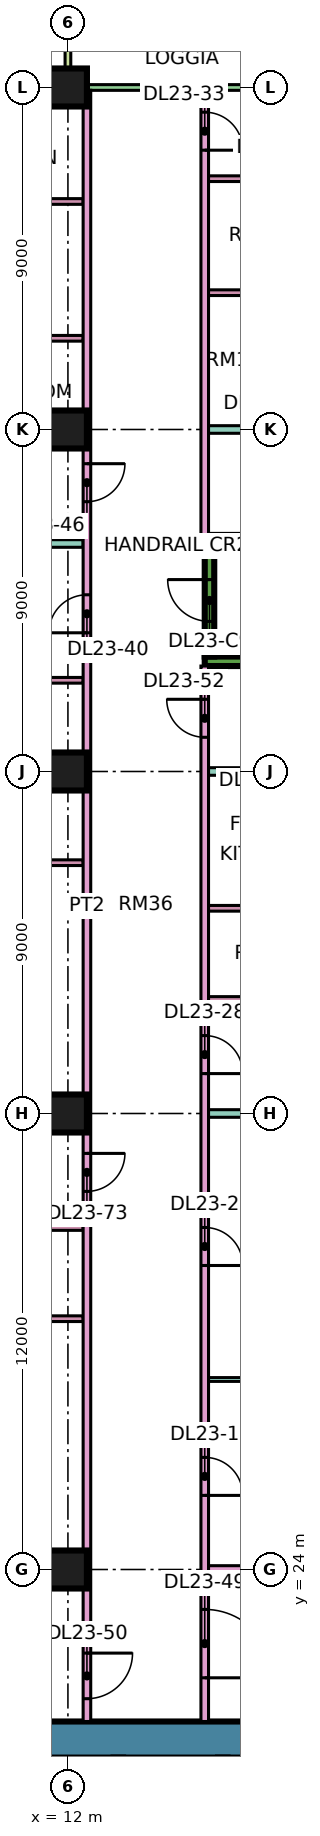
"""IFC4 building model, lengths in metres.
Left out: names, types, materials, properties, quantities, classifications, styles, units other than length and angle.
Written with IfcOpenShell. Run it as: python <this file> out.ifc"""

import sys

from ifc_helpers import new_model, si_unit, direction, frame, frame_2d, origin, origin_2d, place, context, subcontext, project, spatial, rectangle, extrude, element, fill, save


model = new_model("IFC4")
c1 = context("Model", 3, precision=1e-05, world=origin(), true_north=direction((0.0, 1.0)))
c2 = subcontext(c1, "Body", "Model", "MODEL_VIEW")
j1 = project(units=[si_unit("LENGTHUNIT", "METRE"), si_unit("PLANEANGLEUNIT", "RADIAN")], contexts=[c1])
p1 = place(None, origin())
s1 = spatial("IfcSite", under=j1, at=p1, CompositionType="ELEMENT")
p2 = place(p1, origin())
s2 = spatial("IfcBuilding", under=s1, at=p2, CompositionType="ELEMENT")
p3 = place(p2, frame((0.0, 0.0, 103.15)))
s3 = spatial("IfcBuildingStorey", under=s2, at=p3, CompositionType="ELEMENT", Elevation=103.15)
for number, where, z_axis, x_axis in (
    (1, (12.0, 24.0, 0.0), (0.0, 0.0, 1.0), (1.0, 0.0, 0.0)),
    (2, (12.0, 36.0, 0.0), (0.0, 0.0, 1.0), (1.0, 0.0, 0.0)),
    (3, (12.0, 45.0, 0.0), (0.0, 0.0, 1.0), (1.0, 0.0, 0.0)),
    (4, (12.0, 54.0, 0.0), (0.0, 0.0, 1.0), (1.0, 0.0, 0.0)),
    (5, (12.0, 63.0, 0.0), (0.0, 0.0, 1.0), (1.0, 0.0, 0.0)),
):
    element("IfcColumn", number, at=place(p3, frame(where, z_axis=z_axis, x_axis=x_axis)), inside=s3, PredefinedType="COLUMN", context=c2, shape_type="SweptSolid", body=[
        extrude(rectangle(XDim=1.0, YDim=1.0, at=origin_2d()), origin(), (0.0, 0.0, 1.0), 3.75),
    ])
p4 = place(p3, frame((9.0, 19.525, 0.0), z_axis=(0.0, 0.0, 1.0), x_axis=(1.0, 0.0, 0.0)))
e6 = element("IfcWall", 6, at=p4, inside=s3, PredefinedType="SHEAR", context=c2, shape_type="SweptSolid", body=[
    extrude(rectangle(XDim=25.0, YDim=0.95, at=frame_2d((12.5, 0.0))), origin(), (0.0, 0.0, 1.0), 3.75),
])
p5 = place(p4, frame((19.1, 0.0, 0.0)))
e7 = element("IfcOpeningElement", 7, at=p5, cuts=e6, PredefinedType="OPENING", context=c2, shape_type="SweptSolid", body=[
    extrude(rectangle(XDim=1.8, YDim=2.4, at=frame_2d((0.9, 1.2))), frame((0.0, 0.485, 0.0), z_axis=(0.0, -1.0, 0.0), x_axis=(1.0, 0.0, 0.0)), (0.0, 0.0, 1.0), 0.97),
])
for number, where, z_axis, x_axis in (
    (8, (15.6, 47.9, 0.0), (0.0, 0.0, 1.0), (1.0, 0.0, 0.0)),
    (9, (15.6, 51.1, 0.0), (0.0, 0.0, 1.0), (1.0, 0.0, 0.0)),
):
    element("IfcWall", number, at=place(p3, frame(where, z_axis=z_axis, x_axis=x_axis)), inside=s3, PredefinedType="SHEAR", context=c2, shape_type="SweptSolid", body=[
        extrude(rectangle(XDim=7.0, YDim=0.25, at=frame_2d((3.5, 0.0))), origin(), (0.0, 0.0, 1.0), 3.75),
    ])
p6 = place(p3, frame((15.725, 48.025, 0.0), z_axis=(0.0, 0.0, 1.0), x_axis=(0.0, 1.0, 0.0)))
e10 = element("IfcWall", 10, at=p6, inside=s3, PredefinedType="SHEAR", context=c2, shape_type="SweptSolid", body=[
    extrude(rectangle(XDim=2.95, YDim=0.25, at=frame_2d((1.475, 0.0))), origin(), (0.0, 0.0, 1.0), 3.75),
])
p7 = place(p6, frame((0.925, 0.0, 0.0)))
e11 = element("IfcOpeningElement", 11, at=p7, cuts=e10, PredefinedType="OPENING", context=c2, shape_type="SweptSolid", body=[
    extrude(rectangle(XDim=1.1, YDim=2.2, at=frame_2d((0.55, 1.1))), frame((0.0, 0.135, 0.0), z_axis=(0.0, -1.0, 0.0), x_axis=(1.0, 0.0, 0.0)), (0.0, 0.0, 1.0), 0.27),
])
p8 = place(p3, frame((22.425, 63.0, 0.0), z_axis=(0.0, 0.0, 1.0), x_axis=(-1.0, 0.0, 0.0)))
e12 = element("IfcWall", 12, at=p8, inside=s3, PredefinedType="SOLIDWALL", context=c2, shape_type="SweptSolid", body=[
    extrude(rectangle(XDim=10.35, YDim=0.15, at=frame_2d((5.175, 0.0))), origin(), (0.0, 0.0, 1.0), 3.35),
])
p9 = place(p8, frame((0.562, 0.0, 0.45)))
e13 = element("IfcOpeningElement", 13, at=p9, cuts=e12, PredefinedType="OPENING", context=c2, shape_type="SweptSolid", body=[
    extrude(rectangle(XDim=1.8, YDim=2.4, at=frame_2d((0.9, 1.2))), frame((0.0, 0.085, 0.0), z_axis=(0.0, -1.0, 0.0), x_axis=(1.0, 0.0, 0.0)), (0.0, 0.0, 1.0), 0.17),
])
p10 = place(p8, frame((3.975, 0.0, 0.0)))
e14 = element("IfcOpeningElement", 14, at=p10, cuts=e12, PredefinedType="OPENING", context=c2, shape_type="SweptSolid", body=[
    extrude(rectangle(XDim=1.8, YDim=2.4, at=frame_2d((0.9, 1.2))), frame((0.0, 0.085, 0.0), z_axis=(0.0, -1.0, 0.0), x_axis=(1.0, 0.0, 0.0)), (0.0, 0.0, 1.0), 0.17),
])
p11 = place(p3, frame((12.0, 64.5, 0.0), z_axis=(0.0, 0.0, 1.0), x_axis=(0.0, -1.0, 0.0)))
e15 = element("IfcWall", 15, at=p11, inside=s3, PredefinedType="SOLIDWALL", context=c2, shape_type="SweptSolid", body=[
    extrude(rectangle(XDim=1.5, YDim=0.15, at=frame_2d((0.75, 0.0))), origin(), (0.0, 0.0, 1.0), 3.35),
])
p12 = place(p3, frame((0.0, 36.0, 0.0), z_axis=(0.0, 0.0, 1.0), x_axis=(1.0, 0.0, 0.0)))
e16 = element("IfcWall", 16, at=p12, inside=s3, PredefinedType="PARTITIONING", context=c2, shape_type="SweptSolid", body=[
    extrude(rectangle(XDim=12.4, YDim=0.2, at=frame_2d((6.2, 0.0))), origin(), (0.0, 0.0, 1.0), 3.35),
])
p13 = place(p3, frame((-1.35, 51.0, 0.0), z_axis=(0.0, 0.0, 1.0), x_axis=(1.0, 0.0, 0.0)))
e17 = element("IfcWall", 17, at=p13, inside=s3, PredefinedType="PARTITIONING", context=c2, shape_type="SweptSolid", body=[
    extrude(rectangle(XDim=13.75, YDim=0.2, at=frame_2d((6.875, 0.0))), origin(), (0.0, 0.0, 1.0), 3.35),
])
p14 = place(p3, frame((0.074, 22.4, 0.0), z_axis=(0.0, 0.0, 1.0), x_axis=(1.0, 0.0, 0.0)))
e18 = element("IfcWall", 18, at=p14, inside=s3, PredefinedType="PARTITIONING", context=c2, shape_type="SweptSolid", body=[
    extrude(rectangle(XDim=12.326, YDim=0.2, at=frame_2d((6.163, 0.0))), origin(), (0.0, 0.0, 1.0), 3.35),
])
for number, where, z_axis, x_axis in (
    (19, (7.175, 30.6, 0.0), (0.0, 0.0, 1.0), (1.0, 0.0, 0.0)),
    (20, (7.175, 33.0, 0.0), (0.0, 0.0, 1.0), (1.0, 0.0, 0.0)),
    (21, (7.175, 42.6, 0.0), (0.0, 0.0, 1.0), (1.0, 0.0, 0.0)),
    (22, (7.175, 45.3, 0.0), (0.0, 0.0, 1.0), (1.0, 0.0, 0.0)),
    (23, (7.175, 47.4, 0.0), (0.0, 0.0, 1.0), (1.0, 0.0, 0.0)),
):
    element("IfcWall", number, at=place(p3, frame(where, z_axis=z_axis, x_axis=x_axis)), inside=s3, PredefinedType="PARTITIONING", context=c2, shape_type="SweptSolid", body=[
        extrude(rectangle(XDim=5.225, YDim=0.15, at=frame_2d((2.612, 0.0))), origin(), (0.0, 0.0, 1.0), 3.35),
    ])
p15 = place(p3, frame((8.375, 54.3, 0.0), z_axis=(0.0, 0.0, 1.0), x_axis=(1.0, 0.0, 0.0)))
e24 = element("IfcWall", 24, at=p15, inside=s3, PredefinedType="PARTITIONING", context=c2, shape_type="SweptSolid", body=[
    extrude(rectangle(XDim=4.025, YDim=0.15, at=frame_2d((2.012, 0.0))), origin(), (0.0, 0.0, 1.0), 3.35),
])
p16 = place(p15, frame((1.675, 0.0, 0.0)))
e25 = element("IfcOpeningElement", 25, at=p16, cuts=e24, PredefinedType="OPENING", context=c2, shape_type="SweptSolid", body=[
    extrude(rectangle(XDim=0.8, YDim=2.1, at=frame_2d((0.4, 1.05))), frame((0.0, 0.085, 0.0), z_axis=(0.0, -1.0, 0.0), x_axis=(1.0, 0.0, 0.0)), (0.0, 0.0, 1.0), 0.17),
])
for number, where, z_axis, x_axis in (
    (26, (8.375, 56.4, 0.0), (0.0, 0.0, 1.0), (1.0, 0.0, 0.0)),
    (27, (8.375, 60.0, 0.0), (0.0, 0.0, 1.0), (1.0, 0.0, 0.0)),
):
    element("IfcWall", number, at=place(p3, frame(where, z_axis=z_axis, x_axis=x_axis)), inside=s3, PredefinedType="PARTITIONING", context=c2, shape_type="SweptSolid", body=[
        extrude(rectangle(XDim=4.025, YDim=0.15, at=frame_2d((2.012, 0.0))), origin(), (0.0, 0.0, 1.0), 3.35),
    ])
p17 = place(p3, frame((12.5, 20.0, 0.0), z_axis=(0.0, 0.0, 1.0), x_axis=(0.0, 1.0, 0.0)))
e28 = element("IfcWall", 28, at=p17, inside=s3, PredefinedType="PARTITIONING", context=c2, shape_type="SweptSolid", body=[
    extrude(rectangle(XDim=42.926, YDim=0.2, at=frame_2d((21.463, 0.0))), origin(), (0.0, 0.0, 1.0), 3.35),
])
p18 = place(p17, frame((28.65, 0.0, 0.0)))
e29 = element("IfcOpeningElement", 29, at=p18, cuts=e28, PredefinedType="OPENING", context=c2, shape_type="SweptSolid", body=[
    extrude(rectangle(XDim=1.0, YDim=2.1, at=frame_2d((0.5, 1.05))), frame((0.0, 0.11, 0.0), z_axis=(0.0, -1.0, 0.0), x_axis=(1.0, 0.0, 0.0)), (0.0, 0.0, 1.0), 0.22),
])
p19 = place(p17, frame((32.1, 0.0, 0.0)))
e30 = element("IfcOpeningElement", 30, at=p19, cuts=e28, PredefinedType="OPENING", context=c2, shape_type="SweptSolid", body=[
    extrude(rectangle(XDim=1.0, YDim=2.1, at=frame_2d((0.5, 1.05))), frame((0.0, 0.11, 0.0), z_axis=(0.0, -1.0, 0.0), x_axis=(1.0, 0.0, 0.0)), (0.0, 0.0, 1.0), 0.22),
])
p20 = place(p17, frame((0.6, 0.0, 0.0)))
e31 = element("IfcOpeningElement", 31, at=p20, cuts=e28, PredefinedType="OPENING", context=c2, shape_type="SweptSolid", body=[
    extrude(rectangle(XDim=1.2, YDim=2.1, at=frame_2d((0.6, 1.05))), frame((0.0, 0.11, 0.0), z_axis=(0.0, -1.0, 0.0), x_axis=(1.0, 0.0, 0.0)), (0.0, 0.0, 1.0), 0.22),
])
p21 = place(p17, frame((13.95, 0.0, 0.0)))
e32 = element("IfcOpeningElement", 32, at=p21, cuts=e28, PredefinedType="OPENING", context=c2, shape_type="SweptSolid", body=[
    extrude(rectangle(XDim=1.0, YDim=2.1, at=frame_2d((0.5, 1.05))), frame((0.0, 0.11, 0.0), z_axis=(0.0, -1.0, 0.0), x_axis=(1.0, 0.0, 0.0)), (0.0, 0.0, 1.0), 0.22),
])
p22 = place(p3, frame((15.6, 20.0, 0.0), z_axis=(0.0, 0.0, 1.0), x_axis=(0.0, 1.0, 0.0)))
e33 = element("IfcWall", 33, at=p22, inside=s3, PredefinedType="PARTITIONING", context=c2, shape_type="SweptSolid", body=[
    extrude(rectangle(XDim=27.775, YDim=0.2, at=frame_2d((13.887, 0.0))), origin(), (0.0, 0.0, 1.0), 3.35),
])
p23 = place(p22, frame((5.95, 0.0, 0.0)))
e34 = element("IfcOpeningElement", 34, at=p23, cuts=e33, PredefinedType="OPENING", context=c2, shape_type="SweptSolid", body=[
    extrude(rectangle(XDim=1.0, YDim=2.1, at=frame_2d((0.5, 1.05))), frame((0.0, 0.11, 0.0), z_axis=(0.0, -1.0, 0.0), x_axis=(1.0, 0.0, 0.0)), (0.0, 0.0, 1.0), 0.22),
])
p24 = place(p22, frame((12.0, 0.0, 0.0)))
e35 = element("IfcOpeningElement", 35, at=p24, cuts=e33, PredefinedType="OPENING", context=c2, shape_type="SweptSolid", body=[
    extrude(rectangle(XDim=1.0, YDim=2.1, at=frame_2d((0.5, 1.05))), frame((0.0, 0.11, 0.0), z_axis=(0.0, -1.0, 0.0), x_axis=(1.0, 0.0, 0.0)), (0.0, 0.0, 1.0), 0.22),
])
p25 = place(p22, frame((17.05, 0.0, 0.0)))
e36 = element("IfcOpeningElement", 36, at=p25, cuts=e33, PredefinedType="OPENING", context=c2, shape_type="SweptSolid", body=[
    extrude(rectangle(XDim=1.0, YDim=2.1, at=frame_2d((0.5, 1.05))), frame((0.0, 0.11, 0.0), z_axis=(0.0, -1.0, 0.0), x_axis=(1.0, 0.0, 0.0)), (0.0, 0.0, 1.0), 0.22),
])
p26 = place(p22, frame((1.15, 0.0, 0.0)))
e37 = element("IfcOpeningElement", 37, at=p26, cuts=e33, PredefinedType="OPENING", context=c2, shape_type="SweptSolid", body=[
    extrude(rectangle(XDim=1.8, YDim=2.1, at=frame_2d((0.9, 1.05))), frame((0.0, 0.11, 0.0), z_axis=(0.0, -1.0, 0.0), x_axis=(1.0, 0.0, 0.0)), (0.0, 0.0, 1.0), 0.22),
])
p27 = place(p22, frame((25.9, 0.0, 0.0)))
e38 = element("IfcOpeningElement", 38, at=p27, cuts=e33, PredefinedType="OPENING", context=c2, shape_type="SweptSolid", body=[
    extrude(rectangle(XDim=1.0, YDim=2.1, at=frame_2d((0.5, 1.05))), frame((0.0, 0.11, 0.0), z_axis=(0.0, -1.0, 0.0), x_axis=(1.0, 0.0, 0.0)), (0.0, 0.0, 1.0), 0.22),
])
p28 = place(p3, frame((15.6, 51.225, 0.0), z_axis=(0.0, 0.0, 1.0), x_axis=(0.0, 1.0, 0.0)))
e39 = element("IfcWall", 39, at=p28, inside=s3, PredefinedType="PARTITIONING", context=c2, shape_type="SweptSolid", body=[
    extrude(rectangle(XDim=11.701, YDim=0.2, at=frame_2d((5.851, 0.0))), origin(), (0.0, 0.0, 1.0), 3.35),
])
p29 = place(p28, frame((10.125, 0.0, 0.0)))
e40 = element("IfcOpeningElement", 40, at=p29, cuts=e39, PredefinedType="OPENING", context=c2, shape_type="SweptSolid", body=[
    extrude(rectangle(XDim=1.0, YDim=2.1, at=frame_2d((0.5, 1.05))), frame((0.0, 0.11, 0.0), z_axis=(0.0, -1.0, 0.0), x_axis=(1.0, 0.0, 0.0)), (0.0, 0.0, 1.0), 0.22),
])
p30 = place(p3, frame((15.7, 24.0, 0.0), z_axis=(0.0, 0.0, 1.0), x_axis=(1.0, 0.0, 0.0)))
e41 = element("IfcWall", 41, at=p30, inside=s3, PredefinedType="PARTITIONING", context=c2, shape_type="SweptSolid", body=[
    extrude(rectangle(XDim=5.8, YDim=0.2, at=frame_2d((2.9, 0.0))), origin(), (0.0, 0.0, 1.0), 3.35),
])
p31 = place(p3, frame((15.7, 29.0, 0.0), z_axis=(0.0, 0.0, 1.0), x_axis=(1.0, 0.0, 0.0)))
e42 = element("IfcWall", 42, at=p31, inside=s3, PredefinedType="PARTITIONING", context=c2, shape_type="SweptSolid", body=[
    extrude(rectangle(XDim=5.8, YDim=0.1, at=frame_2d((2.9, 0.0))), origin(), (0.0, 0.0, 1.0), 3.35),
])
p32 = place(p3, frame((15.7, 36.0, 0.0), z_axis=(0.0, 0.0, 1.0), x_axis=(1.0, 0.0, 0.0)))
e43 = element("IfcWall", 43, at=p32, inside=s3, PredefinedType="PARTITIONING", context=c2, shape_type="SweptSolid", body=[
    extrude(rectangle(XDim=8.3, YDim=0.2, at=frame_2d((4.15, 0.0))), origin(), (0.0, 0.0, 1.0), 3.35),
])
for number, where, z_axis, x_axis in (
    (44, (15.7, 39.0, 0.0), (0.0, 0.0, 1.0), (1.0, 0.0, 0.0)),
    (45, (15.7, 41.4, 0.0), (0.0, 0.0, 1.0), (1.0, 0.0, 0.0)),
):
    element("IfcWall", number, at=place(p3, frame(where, z_axis=z_axis, x_axis=x_axis)), inside=s3, PredefinedType="PARTITIONING", context=c2, shape_type="SweptSolid", body=[
        extrude(rectangle(XDim=2.825, YDim=0.15, at=frame_2d((1.413, 0.0))), origin(), (0.0, 0.0, 1.0), 3.35),
    ])
p33 = place(p3, frame((15.7, 45.0, 0.0), z_axis=(0.0, 0.0, 1.0), x_axis=(1.0, 0.0, 0.0)))
e46 = element("IfcWall", 46, at=p33, inside=s3, PredefinedType="PARTITIONING", context=c2, shape_type="SweptSolid", body=[
    extrude(rectangle(XDim=8.226, YDim=0.2, at=frame_2d((4.113, 0.0))), origin(), (0.0, 0.0, 1.0), 3.35),
])
p34 = place(p3, frame((15.7, 54.0, 0.0), z_axis=(0.0, 0.0, 1.0), x_axis=(1.0, 0.0, 0.0)))
e47 = element("IfcWall", 47, at=p34, inside=s3, PredefinedType="PARTITIONING", context=c2, shape_type="SweptSolid", body=[
    extrude(rectangle(XDim=8.3, YDim=0.2, at=frame_2d((4.15, 0.0))), origin(), (0.0, 0.0, 1.0), 3.35),
])
for number, where, z_axis, x_axis in (
    (48, (15.7, 57.6, 0.0), (0.0, 0.0, 1.0), (1.0, 0.0, 0.0)),
    (49, (15.7, 60.6, 0.0), (0.0, 0.0, 1.0), (1.0, 0.0, 0.0)),
):
    element("IfcWall", number, at=place(p3, frame(where, z_axis=z_axis, x_axis=x_axis)), inside=s3, PredefinedType="PARTITIONING", context=c2, shape_type="SweptSolid", body=[
        extrude(rectangle(XDim=2.525, YDim=0.15, at=frame_2d((1.263, 0.0))), origin(), (0.0, 0.0, 1.0), 3.35),
    ])
p35 = place(p7, frame((1.1, 0.0, 0.0), z_axis=(0.0, 0.0, 1.0), x_axis=(-1.0, 0.0, 0.0)))
e50 = element("IfcDoor", 50, at=p35, inside=s3, OperationType="SINGLE_SWING_RIGHT", PredefinedType="DOOR", context=c2, shape_type="SweptSolid", body=[
    extrude(rectangle(XDim=1.1, YDim=2.2, at=frame_2d((0.55, 1.1))), frame((0.0, 0.025, 0.0), z_axis=(0.0, -1.0, 0.0), x_axis=(1.0, 0.0, 0.0)), (0.0, 0.0, 1.0), 0.05),
])
fill(e11, e50)
p36 = place(p23, frame((1.0, 0.0, 0.0), z_axis=(0.0, 0.0, 1.0), x_axis=(-1.0, 0.0, 0.0)))
e51 = element("IfcDoor", 51, at=p36, inside=s3, OperationType="SINGLE_SWING_LEFT", PredefinedType="DOOR", context=c2, shape_type="SweptSolid", body=[
    extrude(rectangle(XDim=1.0, YDim=2.1, at=frame_2d((0.5, 1.05))), frame((0.0, 0.025, 0.0), z_axis=(0.0, -1.0, 0.0), x_axis=(1.0, 0.0, 0.0)), (0.0, 0.0, 1.0), 0.05),
])
fill(e34, e51)
p37 = place(p24, frame((1.0, 0.0, 0.0), z_axis=(0.0, 0.0, 1.0), x_axis=(-1.0, 0.0, 0.0)))
e52 = element("IfcDoor", 52, at=p37, inside=s3, OperationType="SINGLE_SWING_LEFT", PredefinedType="DOOR", context=c2, shape_type="SweptSolid", body=[
    extrude(rectangle(XDim=1.0, YDim=2.1, at=frame_2d((0.5, 1.05))), frame((0.0, 0.025, 0.0), z_axis=(0.0, -1.0, 0.0), x_axis=(1.0, 0.0, 0.0)), (0.0, 0.0, 1.0), 0.05),
])
fill(e35, e52)
p38 = place(p25, frame((1.0, 0.0, 0.0), z_axis=(0.0, 0.0, 1.0), x_axis=(-1.0, 0.0, 0.0)))
e53 = element("IfcDoor", 53, at=p38, inside=s3, OperationType="SINGLE_SWING_LEFT", PredefinedType="DOOR", context=c2, shape_type="SweptSolid", body=[
    extrude(rectangle(XDim=1.0, YDim=2.1, at=frame_2d((0.5, 1.05))), frame((0.0, 0.025, 0.0), z_axis=(0.0, -1.0, 0.0), x_axis=(1.0, 0.0, 0.0)), (0.0, 0.0, 1.0), 0.05),
])
fill(e36, e53)
p39 = place(p29, frame((1.0, 0.0, 0.0), z_axis=(0.0, 0.0, 1.0), x_axis=(-1.0, 0.0, 0.0)))
e54 = element("IfcDoor", 54, at=p39, inside=s3, OperationType="SINGLE_SWING_LEFT", PredefinedType="DOOR", context=c2, shape_type="SweptSolid", body=[
    extrude(rectangle(XDim=1.0, YDim=2.1, at=frame_2d((0.5, 1.05))), frame((0.0, 0.025, 0.0), z_axis=(0.0, -1.0, 0.0), x_axis=(1.0, 0.0, 0.0)), (0.0, 0.0, 1.0), 0.05),
])
fill(e40, e54)
p40 = place(p18, origin())
e55 = element("IfcDoor", 55, at=p40, inside=s3, OperationType="SINGLE_SWING_LEFT", PredefinedType="DOOR", context=c2, shape_type="SweptSolid", body=[
    extrude(rectangle(XDim=1.0, YDim=2.1, at=frame_2d((0.5, 1.05))), frame((0.0, 0.025, 0.0), z_axis=(0.0, -1.0, 0.0), x_axis=(1.0, 0.0, 0.0)), (0.0, 0.0, 1.0), 0.05),
])
fill(e29, e55)
p41 = place(p19, origin())
e56 = element("IfcDoor", 56, at=p41, inside=s3, OperationType="SINGLE_SWING_RIGHT", PredefinedType="DOOR", context=c2, shape_type="SweptSolid", body=[
    extrude(rectangle(XDim=1.0, YDim=2.1, at=frame_2d((0.5, 1.05))), frame((0.0, 0.025, 0.0), z_axis=(0.0, -1.0, 0.0), x_axis=(1.0, 0.0, 0.0)), (0.0, 0.0, 1.0), 0.05),
])
fill(e30, e56)
p42 = place(p26, frame((1.8, 0.0, 0.0), z_axis=(0.0, 0.0, 1.0), x_axis=(-1.0, 0.0, 0.0)))
e57 = element("IfcDoor", 57, at=p42, inside=s3, OperationType="DOUBLE_DOOR_SINGLE_SWING", PredefinedType="DOOR", context=c2, shape_type="SweptSolid", body=[
    extrude(rectangle(XDim=1.8, YDim=2.1, at=frame_2d((0.9, 1.05))), frame((0.0, 0.025, 0.0), z_axis=(0.0, -1.0, 0.0), x_axis=(1.0, 0.0, 0.0)), (0.0, 0.0, 1.0), 0.05),
])
fill(e37, e57)
p43 = place(p20, origin())
e58 = element("IfcDoor", 58, at=p43, inside=s3, OperationType="SINGLE_SWING_RIGHT", PredefinedType="DOOR", context=c2, shape_type="SweptSolid", body=[
    extrude(rectangle(XDim=1.2, YDim=2.1, at=frame_2d((0.6, 1.05))), frame((0.0, 0.025, 0.0), z_axis=(0.0, -1.0, 0.0), x_axis=(1.0, 0.0, 0.0)), (0.0, 0.0, 1.0), 0.05),
])
fill(e31, e58)
p44 = place(p27, frame((1.0, 0.0, 0.0), z_axis=(0.0, 0.0, 1.0), x_axis=(-1.0, 0.0, 0.0)))
e59 = element("IfcDoor", 59, at=p44, inside=s3, OperationType="SINGLE_SWING_RIGHT", PredefinedType="DOOR", context=c2, shape_type="SweptSolid", body=[
    extrude(rectangle(XDim=1.0, YDim=2.1, at=frame_2d((0.5, 1.05))), frame((0.0, 0.025, 0.0), z_axis=(0.0, -1.0, 0.0), x_axis=(1.0, 0.0, 0.0)), (0.0, 0.0, 1.0), 0.05),
])
fill(e38, e59)
p45 = place(p21, origin())
e60 = element("IfcDoor", 60, at=p45, inside=s3, OperationType="SINGLE_SWING_RIGHT", PredefinedType="DOOR", context=c2, shape_type="SweptSolid", body=[
    extrude(rectangle(XDim=1.0, YDim=2.1, at=frame_2d((0.5, 1.05))), frame((0.0, 0.025, 0.0), z_axis=(0.0, -1.0, 0.0), x_axis=(1.0, 0.0, 0.0)), (0.0, 0.0, 1.0), 0.05),
])
fill(e32, e60)
save(model, sys.argv[1])
